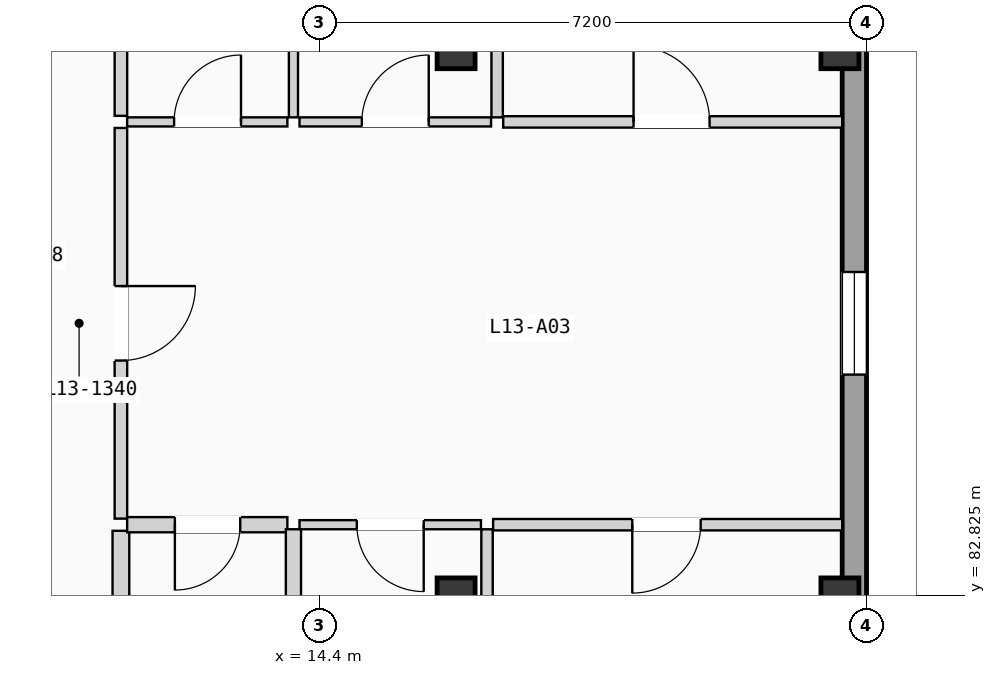
"""IFC4 building model, lengths in metres.
Left out: names, types, materials, properties, quantities, classifications, styles, units other than length and angle.
Written with IfcOpenShell. Run it as: python <this file> out.ifc"""

import sys

from ifc_helpers import new_model, si_unit, direction, frame, frame_2d, origin, origin_2d, place, context, subcontext, project, spatial, rectangle, extrude, element, fill, save


model = new_model("IFC4")
c1 = context("Model", 3, precision=1e-05, world=origin(), true_north=direction((0.0, 1.0)))
c2 = subcontext(c1, "Body", "Model", "MODEL_VIEW")
j1 = project(units=[si_unit("LENGTHUNIT", "METRE"), si_unit("PLANEANGLEUNIT", "RADIAN")], contexts=[c1])
p1 = place(None, origin())
s1 = spatial("IfcSite", under=j1, at=p1, CompositionType="ELEMENT")
p2 = place(p1, origin())
s2 = spatial("IfcBuilding", under=s1, at=p2, CompositionType="ELEMENT")
p3 = place(p2, frame((0.0, 0.0, 43.575)))
s3 = spatial("IfcBuildingStorey", under=s2, at=p3, CompositionType="ELEMENT", Elevation=43.575)
for number, where, z_axis, x_axis in (
    (1, (16.2, 82.8, 0.0), (0.0, 0.0, 1.0), (1.0, 0.0, 0.0)),
    (2, (16.2, 90.0, 0.0), (0.0, 0.0, 1.0), (1.0, 0.0, 0.0)),
    (3, (21.25, 82.8, 0.0), (0.0, 0.0, 1.0), (1.0, 0.0, 0.0)),
    (4, (21.25, 90.0, 0.0), (0.0, 0.0, 1.0), (1.0, 0.0, 0.0)),
):
    element("IfcColumn", number, at=place(p3, frame(where, z_axis=z_axis, x_axis=x_axis)), inside=s3, PredefinedType="COLUMN", context=c2, shape_type="SweptSolid", body=[
        extrude(rectangle(XDim=0.5, YDim=0.5, at=origin_2d()), origin(), (0.0, 0.0, 1.0), 3.15),
    ])
p4 = place(p3, frame((21.44, 68.72, 0.0), z_axis=(0.0, 0.0, 1.0), x_axis=(0.0, 1.0, 0.0)))
e5 = element("IfcWall", 5, at=p4, inside=s3, PredefinedType="SOLIDWALL", context=c2, shape_type="SweptSolid", body=[
    extrude(rectangle(XDim=49.76, YDim=0.32, at=frame_2d((24.88, 0.0))), origin(), (0.0, 0.0, 1.0), 2.6),
])
p5 = place(p4, frame((17.005, 0.0, 0.665)))
e6 = element("IfcOpeningElement", 6, at=p5, cuts=e5, PredefinedType="OPENING", context=c2, shape_type="SweptSolid", body=[
    extrude(rectangle(XDim=1.35, YDim=1.5, at=frame_2d((0.675, 0.75))), frame((0.0, 0.17, 0.0), z_axis=(0.0, -1.0, 0.0), x_axis=(1.0, 0.0, 0.0)), (0.0, 0.0, 1.0), 0.34),
])
p6 = place(p4, frame((9.87, 0.0, 0.515)))
e7 = element("IfcOpeningElement", 7, at=p6, cuts=e5, PredefinedType="OPENING", context=c2, shape_type="SweptSolid", body=[
    extrude(rectangle(XDim=1.35, YDim=1.65, at=frame_2d((0.675, 0.825))), frame((0.0, 0.17, 0.0), z_axis=(0.0, -1.0, 0.0), x_axis=(1.0, 0.0, 0.0)), (0.0, 0.0, 1.0), 0.34),
])
p7 = place(p4, frame((24.405, 0.0, 0.85)))
e8 = element("IfcOpeningElement", 8, at=p7, cuts=e5, PredefinedType="OPENING", context=c2, shape_type="SweptSolid", body=[
    extrude(rectangle(XDim=0.95, YDim=1.2, at=frame_2d((0.475, 0.6))), frame((0.0, 0.17, 0.0), z_axis=(0.0, -1.0, 0.0), x_axis=(1.0, 0.0, 0.0)), (0.0, 0.0, 1.0), 0.34),
])
p8 = place(p4, frame((33.419, 0.0, 0.9)))
e9 = element("IfcOpeningElement", 9, at=p8, cuts=e5, PredefinedType="OPENING", context=c2, shape_type="SweptSolid", body=[
    extrude(rectangle(XDim=1.48, YDim=1.2, at=frame_2d((0.74, 0.6))), frame((0.0, 0.17, 0.0), z_axis=(0.0, -1.0, 0.0), x_axis=(1.0, 0.0, 0.0)), (0.0, 0.0, 1.0), 0.34),
])
p9 = place(p4, frame((30.009, 0.0, 0.815)))
e10 = element("IfcOpeningElement", 10, at=p9, cuts=e5, PredefinedType="OPENING", context=c2, shape_type="SweptSolid", body=[
    extrude(rectangle(XDim=1.48, YDim=1.35, at=frame_2d((0.74, 0.675))), frame((0.0, 0.17, 0.0), z_axis=(0.0, -1.0, 0.0), x_axis=(1.0, 0.0, 0.0)), (0.0, 0.0, 1.0), 0.34),
])
p10 = place(p4, frame((39.612, 0.0, 0.665)))
e11 = element("IfcOpeningElement", 11, at=p10, cuts=e5, PredefinedType="OPENING", context=c2, shape_type="SweptSolid", body=[
    extrude(rectangle(XDim=1.48, YDim=1.5, at=frame_2d((0.74, 0.75))), frame((0.0, 0.17, 0.0), z_axis=(0.0, -1.0, 0.0), x_axis=(1.0, 0.0, 0.0)), (0.0, 0.0, 1.0), 0.34),
])
p11 = place(p3, frame((11.79, 83.83, 0.0), z_axis=(0.0, 0.0, 1.0), x_axis=(0.0, 1.0, 0.0)))
e12 = element("IfcWall", 12, at=p11, inside=s3, PredefinedType="PARTITIONING", context=c2, shape_type="SweptSolid", body=[
    extrude(rectangle(XDim=5.14, YDim=0.165, at=frame_2d((2.57, 0.0))), origin(), (0.0, 0.0, 1.0), 2.87),
])
p12 = place(p11, frame((2.08, 0.0, 0.0)))
e13 = element("IfcOpeningElement", 13, at=p12, cuts=e12, PredefinedType="OPENING", context=c2, shape_type="SweptSolid", body=[
    extrude(rectangle(XDim=0.98, YDim=2.08, at=frame_2d((0.49, 1.04))), frame((0.0, 0.093, 0.0), z_axis=(0.0, -1.0, 0.0), x_axis=(1.0, 0.0, 0.0)), (0.0, 0.0, 1.0), 0.185),
])
p13 = place(p3, frame((11.79, 75.975, 0.0), z_axis=(0.0, 0.0, 1.0), x_axis=(0.0, 1.0, 0.0)))
e14 = element("IfcWall", 14, at=p13, inside=s3, PredefinedType="PLUMBINGWALL", context=c2, shape_type="SweptSolid", body=[
    extrude(rectangle(XDim=7.695, YDim=0.22, at=frame_2d((3.847, 0.0))), origin(), (0.0, 0.0, 1.0), 2.87),
])
p14 = place(p3, frame((11.79, 89.13, 0.0), z_axis=(0.0, 0.0, 1.0), x_axis=(0.0, 1.0, 0.0)))
e15 = element("IfcWall", 15, at=p14, inside=s3, PredefinedType="PARTITIONING", context=c2, shape_type="SweptSolid", body=[
    extrude(rectangle(XDim=7.9, YDim=0.165, at=frame_2d((3.95, 0.0))), origin(), (0.0, 0.0, 1.0), 2.87),
])
p15 = place(p3, frame((11.872, 83.75, 0.0), z_axis=(0.0, 0.0, 1.0), x_axis=(1.0, 0.0, 0.0)))
e16 = element("IfcWall", 16, at=p15, inside=s3, PredefinedType="PLUMBINGWALL", context=c2, shape_type="SweptSolid", body=[
    extrude(rectangle(XDim=2.108, YDim=0.2, at=frame_2d((1.054, 0.0))), origin(), (0.0, 0.0, 1.0), 2.87),
])
p16 = place(p15, frame((0.628, 0.0, 0.0)))
e17 = element("IfcOpeningElement", 17, at=p16, cuts=e16, PredefinedType="OPENING", context=c2, shape_type="SweptSolid", body=[
    extrude(rectangle(XDim=0.86, YDim=2.0, at=frame_2d((0.43, 1.0))), frame((0.0, 0.11, 0.0), z_axis=(0.0, -1.0, 0.0), x_axis=(1.0, 0.0, 0.0)), (0.0, 0.0, 1.0), 0.22),
])
p17 = place(p3, frame((11.872, 89.05, 0.0), z_axis=(0.0, 0.0, 1.0), x_axis=(1.0, 0.0, 0.0)))
e18 = element("IfcWall", 18, at=p17, inside=s3, PredefinedType="PARTITIONING", context=c2, shape_type="SweptSolid", body=[
    extrude(rectangle(XDim=2.108, YDim=0.12, at=frame_2d((1.054, 0.0))), origin(), (0.0, 0.0, 1.0), 2.87),
])
p18 = place(p17, frame((0.618, 0.0, 0.0)))
e19 = element("IfcOpeningElement", 19, at=p18, cuts=e18, PredefinedType="OPENING", context=c2, shape_type="SweptSolid", body=[
    extrude(rectangle(XDim=0.88, YDim=2.02, at=frame_2d((0.44, 1.01))), frame((0.0, 0.07, 0.0), z_axis=(0.0, -1.0, 0.0), x_axis=(1.0, 0.0, 0.0)), (0.0, 0.0, 1.0), 0.14),
])
p19 = place(p3, frame((16.687, 83.75, 0.0), z_axis=(0.0, 0.0, 1.0), x_axis=(1.0, 0.0, 0.0)))
e20 = element("IfcWall", 20, at=p19, inside=s3, PredefinedType="PARTITIONING", context=c2, shape_type="SweptSolid", body=[
    extrude(rectangle(XDim=4.593, YDim=0.15, at=frame_2d((2.296, 0.0))), origin(), (0.0, 0.0, 1.0), 2.87),
])
p20 = place(p19, frame((1.831, 0.0, 0.0)))
e21 = element("IfcOpeningElement", 21, at=p20, cuts=e20, PredefinedType="OPENING", context=c2, shape_type="SweptSolid", body=[
    extrude(rectangle(XDim=0.9, YDim=2.04, at=frame_2d((0.45, 1.02))), frame((0.0, 0.085, 0.0), z_axis=(0.0, -1.0, 0.0), x_axis=(1.0, 0.0, 0.0)), (0.0, 0.0, 1.0), 0.17),
])
p21 = place(p3, frame((14.14, 83.75, 0.0), z_axis=(0.0, 0.0, 1.0), x_axis=(1.0, 0.0, 0.0)))
e22 = element("IfcWall", 22, at=p21, inside=s3, PredefinedType="PARTITIONING", context=c2, shape_type="SweptSolid", body=[
    extrude(rectangle(XDim=2.387, YDim=0.12, at=frame_2d((1.194, 0.0))), origin(), (0.0, 0.0, 1.0), 2.87),
])
p22 = place(p21, frame((0.754, 0.0, 0.0)))
e23 = element("IfcOpeningElement", 23, at=p22, cuts=e22, PredefinedType="OPENING", context=c2, shape_type="SweptSolid", body=[
    extrude(rectangle(XDim=0.88, YDim=2.02, at=frame_2d((0.44, 1.01))), frame((0.0, 0.07, 0.0), z_axis=(0.0, -1.0, 0.0), x_axis=(1.0, 0.0, 0.0)), (0.0, 0.0, 1.0), 0.14),
])
p23 = place(p3, frame((16.82, 89.05, 0.0), z_axis=(0.0, 0.0, 1.0), x_axis=(1.0, 0.0, 0.0)))
e24 = element("IfcWall", 24, at=p23, inside=s3, PredefinedType="PARTITIONING", context=c2, shape_type="SweptSolid", body=[
    extrude(rectangle(XDim=4.46, YDim=0.15, at=frame_2d((2.23, 0.0))), origin(), (0.0, 0.0, 1.0), 2.87),
])
p24 = place(p23, frame((1.715, 0.0, 0.0)))
e25 = element("IfcOpeningElement", 25, at=p24, cuts=e24, PredefinedType="OPENING", context=c2, shape_type="SweptSolid", body=[
    extrude(rectangle(XDim=1.0, YDim=2.06, at=frame_2d((0.5, 1.03))), frame((0.0, 0.085, 0.0), z_axis=(0.0, -1.0, 0.0), x_axis=(1.0, 0.0, 0.0)), (0.0, 0.0, 1.0), 0.17),
])
p25 = place(p3, frame((14.14, 89.05, 0.0), z_axis=(0.0, 0.0, 1.0), x_axis=(1.0, 0.0, 0.0)))
e26 = element("IfcWall", 26, at=p25, inside=s3, PredefinedType="PARTITIONING", context=c2, shape_type="SweptSolid", body=[
    extrude(rectangle(XDim=2.52, YDim=0.12, at=frame_2d((1.26, 0.0))), origin(), (0.0, 0.0, 1.0), 2.87),
])
p26 = place(p25, frame((0.82, 0.0, 0.0)))
e27 = element("IfcOpeningElement", 27, at=p26, cuts=e26, PredefinedType="OPENING", context=c2, shape_type="SweptSolid", body=[
    extrude(rectangle(XDim=0.88, YDim=2.02, at=frame_2d((0.44, 1.01))), frame((0.0, 0.07, 0.0), z_axis=(0.0, -1.0, 0.0), x_axis=(1.0, 0.0, 0.0)), (0.0, 0.0, 1.0), 0.14),
])
p27 = place(p3, frame((14.06, 75.975, 0.0), z_axis=(0.0, 0.0, 1.0), x_axis=(0.0, 1.0, 0.0)))
e28 = element("IfcWall", 28, at=p27, inside=s3, PredefinedType="PLUMBINGWALL", context=c2, shape_type="SweptSolid", body=[
    extrude(rectangle(XDim=7.715, YDim=0.2, at=frame_2d((3.857, 0.0))), origin(), (0.0, 0.0, 1.0), 2.87),
])
p28 = place(p27, frame((3.435, 0.0, 0.0)))
e29 = element("IfcOpeningElement", 29, at=p28, cuts=e28, PredefinedType="OPENING", context=c2, shape_type="SweptSolid", body=[
    extrude(rectangle(XDim=0.85, YDim=2.01, at=frame_2d((0.425, 1.005))), frame((0.0, 0.11, 0.0), z_axis=(0.0, -1.0, 0.0), x_axis=(1.0, 0.0, 0.0)), (0.0, 0.0, 1.0), 0.22),
])
p29 = place(p3, frame((14.06, 89.11, 0.0), z_axis=(0.0, 0.0, 1.0), x_axis=(0.0, 1.0, 0.0)))
e30 = element("IfcWall", 30, at=p29, inside=s3, PredefinedType="PARTITIONING", context=c2, shape_type="SweptSolid", body=[
    extrude(rectangle(XDim=7.92, YDim=0.12, at=frame_2d((3.96, 0.0))), origin(), (0.0, 0.0, 1.0), 2.87),
])
p30 = place(p3, frame((16.607, 76.0, 0.0), z_axis=(0.0, 0.0, 1.0), x_axis=(0.0, 1.0, 0.0)))
e31 = element("IfcWall", 31, at=p30, inside=s3, PredefinedType="PARTITIONING", context=c2, shape_type="SweptSolid", body=[
    extrude(rectangle(XDim=7.69, YDim=0.15, at=frame_2d((3.845, 0.0))), origin(), (0.0, 0.0, 1.0), 2.87),
])
p31 = place(p3, frame((16.74, 89.11, 0.0), z_axis=(0.0, 0.0, 1.0), x_axis=(0.0, 1.0, 0.0)))
e32 = element("IfcWall", 32, at=p31, inside=s3, PredefinedType="PARTITIONING", context=c2, shape_type="SweptSolid", body=[
    extrude(rectangle(XDim=7.92, YDim=0.15, at=frame_2d((3.96, 0.0))), origin(), (0.0, 0.0, 1.0), 2.87),
])
p32 = place(p5, origin())
e33 = element("IfcWindow", 33, at=p32, inside=s3, PartitioningType="SINGLE_PANEL", PredefinedType="WINDOW", context=c2, shape_type="SweptSolid", body=[
    extrude(rectangle(XDim=1.35, YDim=1.5, at=frame_2d((0.675, 0.75))), frame((0.0, 0.03, 0.0), z_axis=(0.0, -1.0, 0.0), x_axis=(1.0, 0.0, 0.0)), (0.0, 0.0, 1.0), 0.06),
])
fill(e6, e33)
p33 = place(p12, frame((0.98, 0.0, 0.0), z_axis=(0.0, 0.0, 1.0), x_axis=(-1.0, 0.0, 0.0)))
e34 = element("IfcDoor", 34, at=p33, inside=s3, OperationType="SINGLE_SWING_RIGHT", PredefinedType="DOOR", context=c2, shape_type="SweptSolid", body=[
    extrude(rectangle(XDim=0.98, YDim=2.08, at=frame_2d((0.49, 1.04))), frame((0.0, 0.025, 0.0), z_axis=(0.0, -1.0, 0.0), x_axis=(1.0, 0.0, 0.0)), (0.0, 0.0, 1.0), 0.05),
])
fill(e13, e34)
p34 = place(p16, frame((0.86, 0.0, 0.0), z_axis=(0.0, 0.0, 1.0), x_axis=(-1.0, 0.0, 0.0)))
e35 = element("IfcDoor", 35, at=p34, inside=s3, OperationType="SINGLE_SWING_LEFT", PredefinedType="DOOR", context=c2, shape_type="SweptSolid", body=[
    extrude(rectangle(XDim=0.86, YDim=2.0, at=frame_2d((0.43, 1.0))), frame((0.0, 0.025, 0.0), z_axis=(0.0, -1.0, 0.0), x_axis=(1.0, 0.0, 0.0)), (0.0, 0.0, 1.0), 0.05),
])
fill(e17, e35)
p35 = place(p18, origin())
e36 = element("IfcDoor", 36, at=p35, inside=s3, OperationType="SINGLE_SWING_RIGHT", PredefinedType="DOOR", context=c2, shape_type="SweptSolid", body=[
    extrude(rectangle(XDim=0.88, YDim=2.02, at=frame_2d((0.44, 1.01))), frame((0.0, 0.025, 0.0), z_axis=(0.0, -1.0, 0.0), x_axis=(1.0, 0.0, 0.0)), (0.0, 0.0, 1.0), 0.05),
])
fill(e19, e36)
p36 = place(p20, frame((0.9, 0.0, 0.0), z_axis=(0.0, 0.0, 1.0), x_axis=(-1.0, 0.0, 0.0)))
e37 = element("IfcDoor", 37, at=p36, inside=s3, OperationType="SINGLE_SWING_LEFT", PredefinedType="DOOR", context=c2, shape_type="SweptSolid", body=[
    extrude(rectangle(XDim=0.9, YDim=2.04, at=frame_2d((0.45, 1.02))), frame((0.0, 0.025, 0.0), z_axis=(0.0, -1.0, 0.0), x_axis=(1.0, 0.0, 0.0)), (0.0, 0.0, 1.0), 0.05),
])
fill(e21, e37)
p37 = place(p22, frame((0.88, 0.0, 0.0), z_axis=(0.0, 0.0, 1.0), x_axis=(-1.0, 0.0, 0.0)))
e38 = element("IfcDoor", 38, at=p37, inside=s3, OperationType="SINGLE_SWING_RIGHT", PredefinedType="DOOR", context=c2, shape_type="SweptSolid", body=[
    extrude(rectangle(XDim=0.88, YDim=2.02, at=frame_2d((0.44, 1.01))), frame((0.0, 0.025, 0.0), z_axis=(0.0, -1.0, 0.0), x_axis=(1.0, 0.0, 0.0)), (0.0, 0.0, 1.0), 0.05),
])
fill(e23, e38)
p38 = place(p24, origin())
e39 = element("IfcDoor", 39, at=p38, inside=s3, OperationType="SINGLE_SWING_LEFT", PredefinedType="DOOR", context=c2, shape_type="SweptSolid", body=[
    extrude(rectangle(XDim=1.0, YDim=2.06, at=frame_2d((0.5, 1.03))), frame((0.0, 0.025, 0.0), z_axis=(0.0, -1.0, 0.0), x_axis=(1.0, 0.0, 0.0)), (0.0, 0.0, 1.0), 0.05),
])
fill(e25, e39)
p39 = place(p26, origin())
e40 = element("IfcDoor", 40, at=p39, inside=s3, OperationType="SINGLE_SWING_RIGHT", PredefinedType="DOOR", context=c2, shape_type="SweptSolid", body=[
    extrude(rectangle(XDim=0.88, YDim=2.02, at=frame_2d((0.44, 1.01))), frame((0.0, 0.025, 0.0), z_axis=(0.0, -1.0, 0.0), x_axis=(1.0, 0.0, 0.0)), (0.0, 0.0, 1.0), 0.05),
])
fill(e27, e40)
save(model, sys.argv[1])
